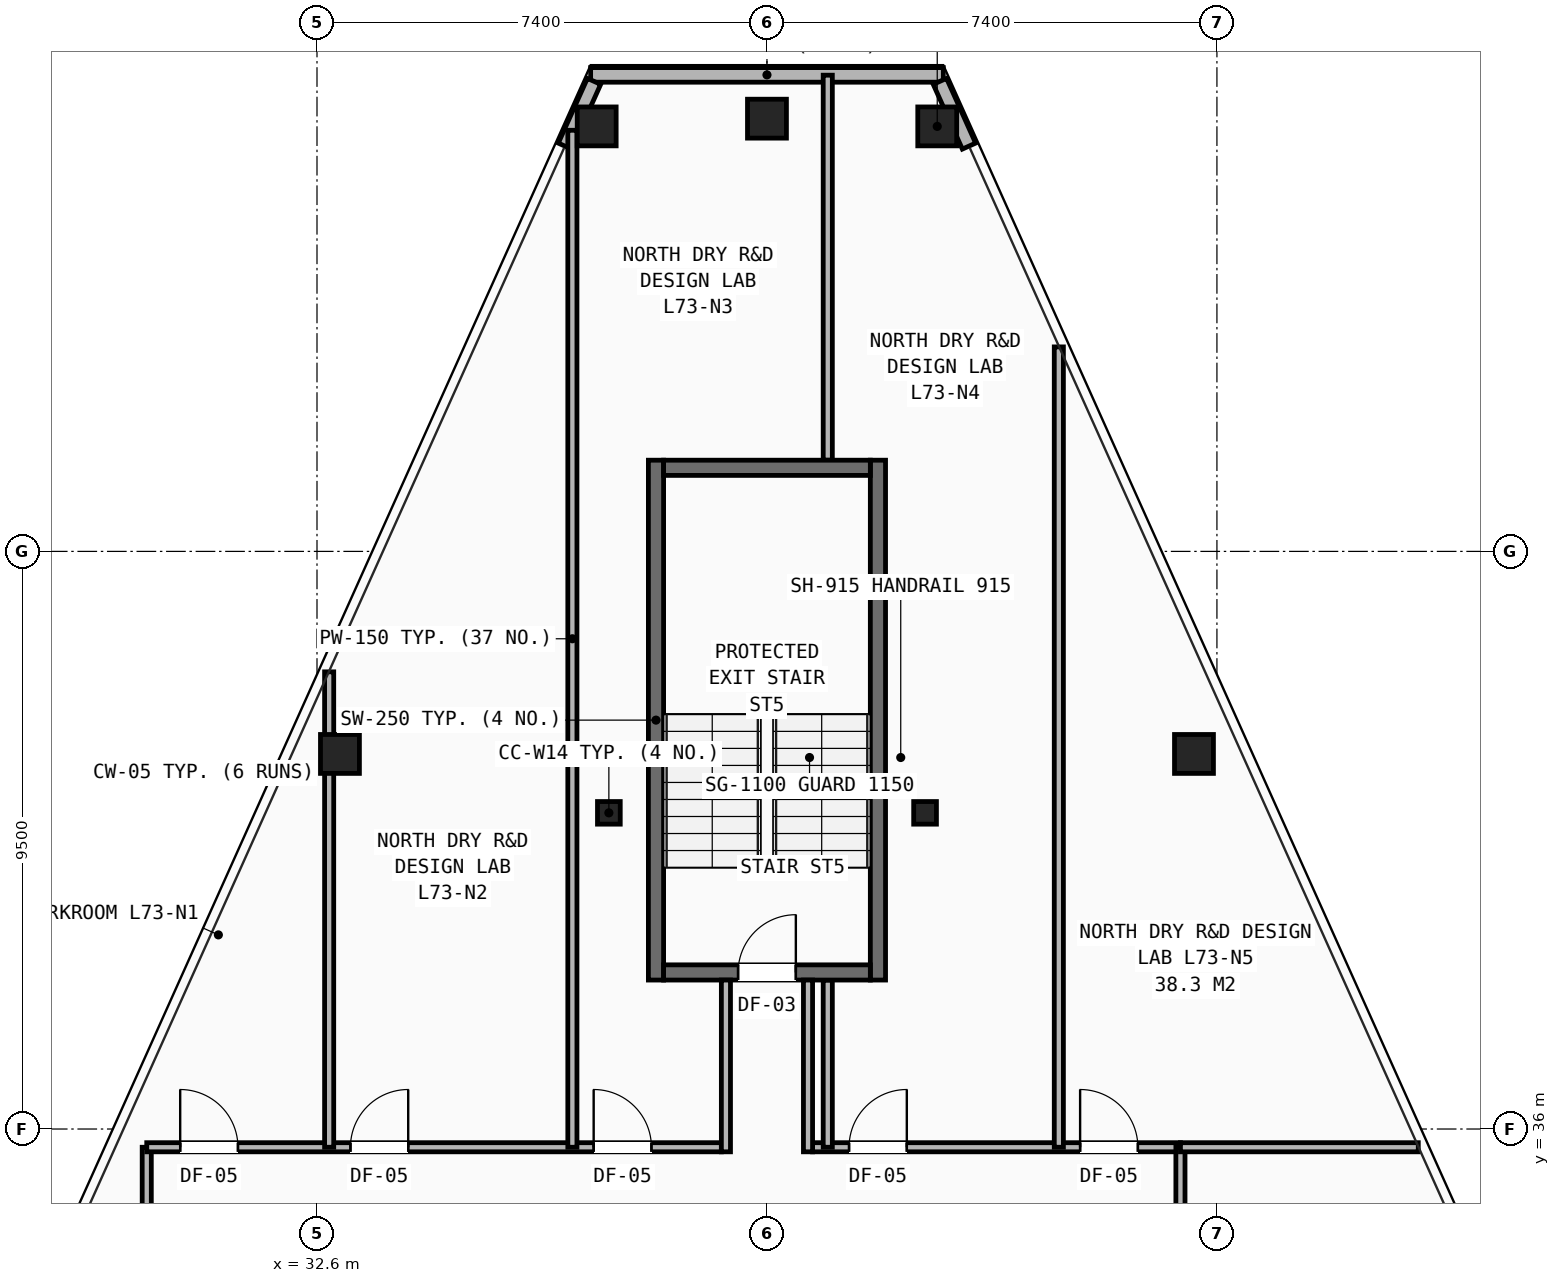
"""IFC4 building model, lengths in metres.
Left out: names, types, materials, properties, quantities, classifications, styles, units other than length and angle.
Written with IfcOpenShell. Run it as: python <this file> out.ifc"""

import sys

from ifc_helpers import new_model, si_unit, direction, frame, frame_2d, origin, origin_2d, place, context, subcontext, project, spatial, rectangle, hollow_rectangle, i_section, extrude, element, fill, save


model = new_model("IFC4")
c1 = context("Model", 3, precision=1e-05, world=origin(), true_north=direction((0.0, 1.0)))
c2 = subcontext(c1, "Body", "Model", "MODEL_VIEW")
j1 = project(units=[si_unit("LENGTHUNIT", "METRE"), si_unit("PLANEANGLEUNIT", "RADIAN")], contexts=[c1])
p1 = place(None, origin())
s1 = spatial("IfcSite", under=j1, at=p1, CompositionType="ELEMENT")
p2 = place(p1, origin())
s2 = spatial("IfcBuilding", under=s1, at=p2, CompositionType="ELEMENT")
p3 = place(p2, frame((0.0, 0.0, 258.5)))
s3 = spatial("IfcBuildingStorey", under=s2, at=p3, CompositionType="ELEMENT", Elevation=258.5)
for number, where, z_axis, x_axis in (
    (1, (37.4, 41.2, 0.0), (0.0, 0.0, 1.0), (1.0, 0.0, 0.0)),
    (2, (42.6, 41.2, 0.0), (0.0, 0.0, 1.0), (1.0, 0.0, 0.0)),
):
    element("IfcColumn", number, at=place(p3, frame(where, z_axis=z_axis, x_axis=x_axis)), inside=s3, PredefinedType="COLUMN", context=c2, shape_type="SweptSolid", body=[
        extrude(i_section(OverallWidth=0.374, OverallDepth=0.372, WebThickness=0.016, FlangeThickness=0.026, at=origin_2d()), origin(), (0.0, 0.0, 1.0), 3.5),
    ])
for number, where, z_axis, x_axis in (
    (3, (42.8, 52.49, 0.0), (0.0, 0.0, 1.0), (1.0, 0.0, 0.0)),
    (4, (40.0, 52.617, 0.0), (0.0, 0.0, 1.0), (1.0, 0.0, 0.0)),
    (5, (37.2, 52.49, 0.0), (0.0, 0.0, 1.0), (1.0, 0.0, 0.0)),
    (6, (32.977, 42.169, 0.0), (0.0, 0.0, 1.0), (1.0, 0.0, 0.0)),
    (7, (47.023, 42.169, 0.0), (0.0, 0.0, 1.0), (1.0, 0.0, 0.0)),
):
    element("IfcColumn", number, at=place(p3, frame(where, z_axis=z_axis, x_axis=x_axis)), inside=s3, PredefinedType="COLUMN", context=c2, shape_type="SweptSolid", body=[
        extrude(hollow_rectangle(XDim=0.64, YDim=0.64, WallThickness=0.045, at=origin_2d()), origin(), (0.0, 0.0, 1.0), 3.5),
    ])
p4 = place(p3, frame((37.1, 53.337, 0.0), z_axis=(0.0, 0.0, 1.0), x_axis=(1.0, 0.0, 0.0)))
e8 = element("IfcWall", 8, at=p4, inside=s3, PredefinedType="SHEAR", context=c2, shape_type="SweptSolid", body=[
    extrude(rectangle(XDim=5.8, YDim=0.24, at=frame_2d((2.9, 0.0))), origin(), (0.0, 0.0, 1.0), 2.623),
])
for number, where, z_axis, x_axis in (
    (9, (37.156, 53.231, 0.0), (0.0, 0.0, 1.0), (-0.41, -0.912, 0.0)),
    (10, (43.323, 52.166, 0.0), (0.0, 0.0, 1.0), (-0.41, 0.912, 0.0)),
):
    element("IfcWall", number, at=place(p3, frame(where, z_axis=z_axis, x_axis=x_axis)), inside=s3, PredefinedType="SHEAR", context=c2, shape_type="SweptSolid", body=[
        extrude(rectangle(XDim=1.168, YDim=0.24, at=frame_2d((0.584, 0.0))), origin(), (0.0, 0.0, 1.0), 2.623),
    ])
p5 = place(p3, frame((29.8, 16.4, 0.0), z_axis=(0.0, 0.0, 1.0), x_axis=(0.0, 1.0, 0.0)))
e11 = element("IfcWall", 11, at=p5, inside=s3, PredefinedType="PARTITIONING", context=c2, shape_type="SweptSolid", body=[
    extrude(rectangle(XDim=19.3, YDim=0.15, at=frame_2d((9.65, 0.0))), origin(), (0.0, 0.0, 1.0), 2.292),
])
p6 = place(p5, frame((0.35, 0.0, 0.0)))
e12 = element("IfcOpeningElement", 12, at=p6, cuts=e11, PredefinedType="OPENING", context=c2, shape_type="SweptSolid", body=[
    extrude(rectangle(XDim=0.95, YDim=2.1, at=frame_2d((0.475, 1.05))), frame((0.0, 0.085, 0.0), z_axis=(0.0, -1.0, 0.0), x_axis=(1.0, 0.0, 0.0)), (0.0, 0.0, 1.0), 0.17),
])
p7 = place(p5, frame((2.95, 0.0, 0.0)))
e13 = element("IfcOpeningElement", 13, at=p7, cuts=e11, PredefinedType="OPENING", context=c2, shape_type="SweptSolid", body=[
    extrude(rectangle(XDim=0.95, YDim=2.1, at=frame_2d((0.475, 1.05))), frame((0.0, 0.085, 0.0), z_axis=(0.0, -1.0, 0.0), x_axis=(1.0, 0.0, 0.0)), (0.0, 0.0, 1.0), 0.17),
])
p8 = place(p5, frame((6.15, 0.0, 0.0)))
e14 = element("IfcOpeningElement", 14, at=p8, cuts=e11, PredefinedType="OPENING", context=c2, shape_type="SweptSolid", body=[
    extrude(rectangle(XDim=0.95, YDim=2.1, at=frame_2d((0.475, 1.05))), frame((0.0, 0.085, 0.0), z_axis=(0.0, -1.0, 0.0), x_axis=(1.0, 0.0, 0.0)), (0.0, 0.0, 1.0), 0.17),
])
p9 = place(p5, frame((9.45, 0.0, 0.0)))
e15 = element("IfcOpeningElement", 15, at=p9, cuts=e11, PredefinedType="OPENING", context=c2, shape_type="SweptSolid", body=[
    extrude(rectangle(XDim=0.95, YDim=2.1, at=frame_2d((0.475, 1.05))), frame((0.0, 0.085, 0.0), z_axis=(0.0, -1.0, 0.0), x_axis=(1.0, 0.0, 0.0)), (0.0, 0.0, 1.0), 0.17),
])
p10 = place(p5, frame((12.95, 0.0, 0.0)))
e16 = element("IfcOpeningElement", 16, at=p10, cuts=e11, PredefinedType="OPENING", context=c2, shape_type="SweptSolid", body=[
    extrude(rectangle(XDim=0.95, YDim=2.1, at=frame_2d((0.475, 1.05))), frame((0.0, 0.085, 0.0), z_axis=(0.0, -1.0, 0.0), x_axis=(1.0, 0.0, 0.0)), (0.0, 0.0, 1.0), 0.17),
])
p11 = place(p3, frame((29.8, 35.7, 0.0), z_axis=(0.0, 0.0, 1.0), x_axis=(1.0, 0.0, 0.0)))
e17 = element("IfcWall", 17, at=p11, inside=s3, PredefinedType="PARTITIONING", context=c2, shape_type="SweptSolid", body=[
    extrude(rectangle(XDim=9.45, YDim=0.15, at=frame_2d((4.725, 0.0))), origin(), (0.0, 0.0, 1.0), 2.628),
])
p12 = place(p11, frame((0.55, 0.0, 0.0)))
e18 = element("IfcOpeningElement", 18, at=p12, cuts=e17, PredefinedType="OPENING", context=c2, shape_type="SweptSolid", body=[
    extrude(rectangle(XDim=0.95, YDim=2.1, at=frame_2d((0.475, 1.05))), frame((0.0, 0.085, 0.0), z_axis=(0.0, -1.0, 0.0), x_axis=(1.0, 0.0, 0.0)), (0.0, 0.0, 1.0), 0.17),
])
p13 = place(p11, frame((3.35, 0.0, 0.0)))
e19 = element("IfcOpeningElement", 19, at=p13, cuts=e17, PredefinedType="OPENING", context=c2, shape_type="SweptSolid", body=[
    extrude(rectangle(XDim=0.95, YDim=2.1, at=frame_2d((0.475, 1.05))), frame((0.0, 0.085, 0.0), z_axis=(0.0, -1.0, 0.0), x_axis=(1.0, 0.0, 0.0)), (0.0, 0.0, 1.0), 0.17),
])
p14 = place(p11, frame((7.35, 0.0, 0.0)))
e20 = element("IfcOpeningElement", 20, at=p14, cuts=e17, PredefinedType="OPENING", context=c2, shape_type="SweptSolid", body=[
    extrude(rectangle(XDim=0.95, YDim=2.1, at=frame_2d((0.475, 1.05))), frame((0.0, 0.085, 0.0), z_axis=(0.0, -1.0, 0.0), x_axis=(1.0, 0.0, 0.0)), (0.0, 0.0, 1.0), 0.17),
])
p15 = place(p3, frame((40.75, 35.7, 0.0), z_axis=(0.0, 0.0, 1.0), x_axis=(1.0, 0.0, 0.0)))
e21 = element("IfcWall", 21, at=p15, inside=s3, PredefinedType="PARTITIONING", context=c2, shape_type="SweptSolid", body=[
    extrude(rectangle(XDim=6.05, YDim=0.15, at=frame_2d((3.025, 0.0))), origin(), (0.0, 0.0, 1.0), 3.25),
])
p16 = place(p15, frame((0.6, 0.0, 0.0)))
e22 = element("IfcOpeningElement", 22, at=p16, cuts=e21, PredefinedType="OPENING", context=c2, shape_type="SweptSolid", body=[
    extrude(rectangle(XDim=0.95, YDim=2.1, at=frame_2d((0.475, 1.05))), frame((0.0, 0.085, 0.0), z_axis=(0.0, -1.0, 0.0), x_axis=(1.0, 0.0, 0.0)), (0.0, 0.0, 1.0), 0.17),
])
p17 = place(p15, frame((4.4, 0.0, 0.0)))
e23 = element("IfcOpeningElement", 23, at=p17, cuts=e21, PredefinedType="OPENING", context=c2, shape_type="SweptSolid", body=[
    extrude(rectangle(XDim=0.95, YDim=2.1, at=frame_2d((0.475, 1.05))), frame((0.0, 0.085, 0.0), z_axis=(0.0, -1.0, 0.0), x_axis=(1.0, 0.0, 0.0)), (0.0, 0.0, 1.0), 0.17),
])
p18 = place(p3, frame((46.8, 31.2, 0.0), z_axis=(0.0, 0.0, 1.0), x_axis=(0.0, 1.0, 0.0)))
e24 = element("IfcWall", 24, at=p18, inside=s3, PredefinedType="PARTITIONING", context=c2, shape_type="SweptSolid", body=[
    extrude(rectangle(XDim=4.5, YDim=0.15, at=frame_2d((2.25, 0.0))), origin(), (0.0, 0.0, 1.0), 2.705),
])
p19 = place(p3, frame((46.8, 35.7, 0.0), z_axis=(0.0, 0.0, 1.0), x_axis=(1.0, 0.0, 0.0)))
e25 = element("IfcWall", 25, at=p19, inside=s3, PredefinedType="PARTITIONING", context=c2, shape_type="SweptSolid", body=[
    extrude(rectangle(XDim=3.911, YDim=0.15, at=frame_2d((1.956, 0.0))), origin(), (0.0, 0.0, 1.0), 2.628),
])
p20 = place(p3, frame((32.8, 35.7, 0.0), z_axis=(0.0, 0.0, 1.0), x_axis=(0.0, 1.0, 0.0)))
e26 = element("IfcWall", 26, at=p20, inside=s3, PredefinedType="PARTITIONING", context=c2, shape_type="SweptSolid", body=[
    extrude(rectangle(XDim=7.819, YDim=0.15, at=frame_2d((3.91, 0.0))), origin(), (0.0, 0.0, 1.0), 2.292),
])
p21 = place(p3, frame((36.8, 35.7, 0.0), z_axis=(0.0, 0.0, 1.0), x_axis=(0.0, 1.0, 0.0)))
e27 = element("IfcWall", 27, at=p21, inside=s3, PredefinedType="PARTITIONING", context=c2, shape_type="SweptSolid", body=[
    extrude(rectangle(XDim=16.726, YDim=0.15, at=frame_2d((8.363, 0.0))), origin(), (0.0, 0.0, 1.0), 2.292),
])
p22 = place(p3, frame((41.0, 35.7, 0.0), z_axis=(0.0, 0.0, 1.0), x_axis=(0.0, 1.0, 0.0)))
e28 = element("IfcWall", 28, at=p22, inside=s3, PredefinedType="PARTITIONING", context=c2, shape_type="SweptSolid", body=[
    extrude(rectangle(XDim=2.75, YDim=0.15, at=frame_2d((1.375, 0.0))), origin(), (0.0, 0.0, 1.0), 3.25),
])
p23 = place(p3, frame((41.0, 47.0, 0.0), z_axis=(0.0, 0.0, 1.0), x_axis=(0.0, 1.0, 0.0)))
e29 = element("IfcWall", 29, at=p23, inside=s3, PredefinedType="PARTITIONING", context=c2, shape_type="SweptSolid", body=[
    extrude(rectangle(XDim=6.332, YDim=0.15, at=frame_2d((3.166, 0.0))), origin(), (0.0, 0.0, 1.0), 2.628),
])
p24 = place(p3, frame((44.8, 35.7, 0.0), z_axis=(0.0, 0.0, 1.0), x_axis=(0.0, 1.0, 0.0)))
e30 = element("IfcWall", 30, at=p24, inside=s3, PredefinedType="PARTITIONING", context=c2, shape_type="SweptSolid", body=[
    extrude(rectangle(XDim=13.163, YDim=0.15, at=frame_2d((6.582, 0.0))), origin(), (0.0, 0.0, 1.0), 2.292),
])
for number, where, z_axis, x_axis in (
    (31, (38.175, 38.45, 0.0), (0.0, 0.0, 1.0), (0.0, 1.0, 0.0)),
    (32, (41.825, 38.45, 0.0), (0.0, 0.0, 1.0), (0.0, 1.0, 0.0)),
):
    element("IfcWall", number, at=place(p3, frame(where, z_axis=z_axis, x_axis=x_axis)), inside=s3, PredefinedType="SHEAR", context=c2, shape_type="SweptSolid", body=[
        extrude(rectangle(XDim=8.55, YDim=0.25, at=frame_2d((4.275, 0.0))), origin(), (0.0, 0.0, 1.0), 3.25),
    ])
p25 = place(p3, frame((38.3, 38.575, 0.0), z_axis=(0.0, 0.0, 1.0), x_axis=(1.0, 0.0, 0.0)))
e33 = element("IfcWall", 33, at=p25, inside=s3, PredefinedType="SHEAR", context=c2, shape_type="SweptSolid", body=[
    extrude(rectangle(XDim=3.4, YDim=0.25, at=frame_2d((1.7, 0.0))), origin(), (0.0, 0.0, 1.0), 3.25),
])
p26 = place(p25, frame((1.225, 0.0, 0.0)))
e34 = element("IfcOpeningElement", 34, at=p26, cuts=e33, PredefinedType="OPENING", context=c2, shape_type="SweptSolid", body=[
    extrude(rectangle(XDim=0.95, YDim=2.1, at=frame_2d((0.475, 1.05))), frame((0.0, 0.135, 0.0), z_axis=(0.0, -1.0, 0.0), x_axis=(1.0, 0.0, 0.0)), (0.0, 0.0, 1.0), 0.27),
])
p27 = place(p3, frame((38.3, 46.875, 0.0), z_axis=(0.0, 0.0, 1.0), x_axis=(1.0, 0.0, 0.0)))
e35 = element("IfcWall", 35, at=p27, inside=s3, PredefinedType="SHEAR", context=c2, shape_type="SweptSolid", body=[
    extrude(rectangle(XDim=3.4, YDim=0.25, at=frame_2d((1.7, 0.0))), origin(), (0.0, 0.0, 1.0), 3.25),
])
for number, where, z_axis, x_axis in (
    (36, (39.325, 35.625, 0.0), (0.0, 0.0, 1.0), (0.0, 1.0, 0.0)),
    (37, (40.675, 35.625, 0.0), (0.0, 0.0, 1.0), (0.0, 1.0, 0.0)),
):
    element("IfcWall", number, at=place(p3, frame(where, z_axis=z_axis, x_axis=x_axis)), inside=s3, PredefinedType="PARTITIONING", context=c2, shape_type="SweptSolid", body=[
        extrude(rectangle(XDim=2.825, YDim=0.15, at=frame_2d((1.413, 0.0))), origin(), (0.0, 0.0, 1.0), 3.25),
    ])
p28 = place(p12, origin())
e38 = element("IfcDoor", 38, at=p28, inside=s3, OperationType="SINGLE_SWING_LEFT", PredefinedType="DOOR", context=c2, shape_type="SweptSolid", body=[
    extrude(rectangle(XDim=0.95, YDim=2.1, at=frame_2d((0.475, 1.05))), frame((0.0, 0.025, 0.0), z_axis=(0.0, -1.0, 0.0), x_axis=(1.0, 0.0, 0.0)), (0.0, 0.0, 1.0), 0.05),
])
fill(e18, e38)
p29 = place(p13, origin())
e39 = element("IfcDoor", 39, at=p29, inside=s3, OperationType="SINGLE_SWING_RIGHT", PredefinedType="DOOR", context=c2, shape_type="SweptSolid", body=[
    extrude(rectangle(XDim=0.95, YDim=2.1, at=frame_2d((0.475, 1.05))), frame((0.0, 0.025, 0.0), z_axis=(0.0, -1.0, 0.0), x_axis=(1.0, 0.0, 0.0)), (0.0, 0.0, 1.0), 0.05),
])
fill(e19, e39)
p30 = place(p14, origin())
e40 = element("IfcDoor", 40, at=p30, inside=s3, OperationType="SINGLE_SWING_LEFT", PredefinedType="DOOR", context=c2, shape_type="SweptSolid", body=[
    extrude(rectangle(XDim=0.95, YDim=2.1, at=frame_2d((0.475, 1.05))), frame((0.0, 0.025, 0.0), z_axis=(0.0, -1.0, 0.0), x_axis=(1.0, 0.0, 0.0)), (0.0, 0.0, 1.0), 0.05),
])
fill(e20, e40)
p31 = place(p16, origin())
e41 = element("IfcDoor", 41, at=p31, inside=s3, OperationType="SINGLE_SWING_RIGHT", PredefinedType="DOOR", context=c2, shape_type="SweptSolid", body=[
    extrude(rectangle(XDim=0.95, YDim=2.1, at=frame_2d((0.475, 1.05))), frame((0.0, 0.025, 0.0), z_axis=(0.0, -1.0, 0.0), x_axis=(1.0, 0.0, 0.0)), (0.0, 0.0, 1.0), 0.05),
])
fill(e22, e41)
p32 = place(p17, origin())
e42 = element("IfcDoor", 42, at=p32, inside=s3, OperationType="SINGLE_SWING_LEFT", PredefinedType="DOOR", context=c2, shape_type="SweptSolid", body=[
    extrude(rectangle(XDim=0.95, YDim=2.1, at=frame_2d((0.475, 1.05))), frame((0.0, 0.025, 0.0), z_axis=(0.0, -1.0, 0.0), x_axis=(1.0, 0.0, 0.0)), (0.0, 0.0, 1.0), 0.05),
])
fill(e23, e42)
p33 = place(p26, origin())
e43 = element("IfcDoor", 43, at=p33, inside=s3, OperationType="SINGLE_SWING_RIGHT", PredefinedType="DOOR", context=c2, shape_type="SweptSolid", body=[
    extrude(rectangle(XDim=0.95, YDim=2.1, at=frame_2d((0.475, 1.05))), frame((0.0, 0.025, 0.0), z_axis=(0.0, -1.0, 0.0), x_axis=(1.0, 0.0, 0.0)), (0.0, 0.0, 1.0), 0.05),
])
fill(e34, e43)
save(model, sys.argv[1])
